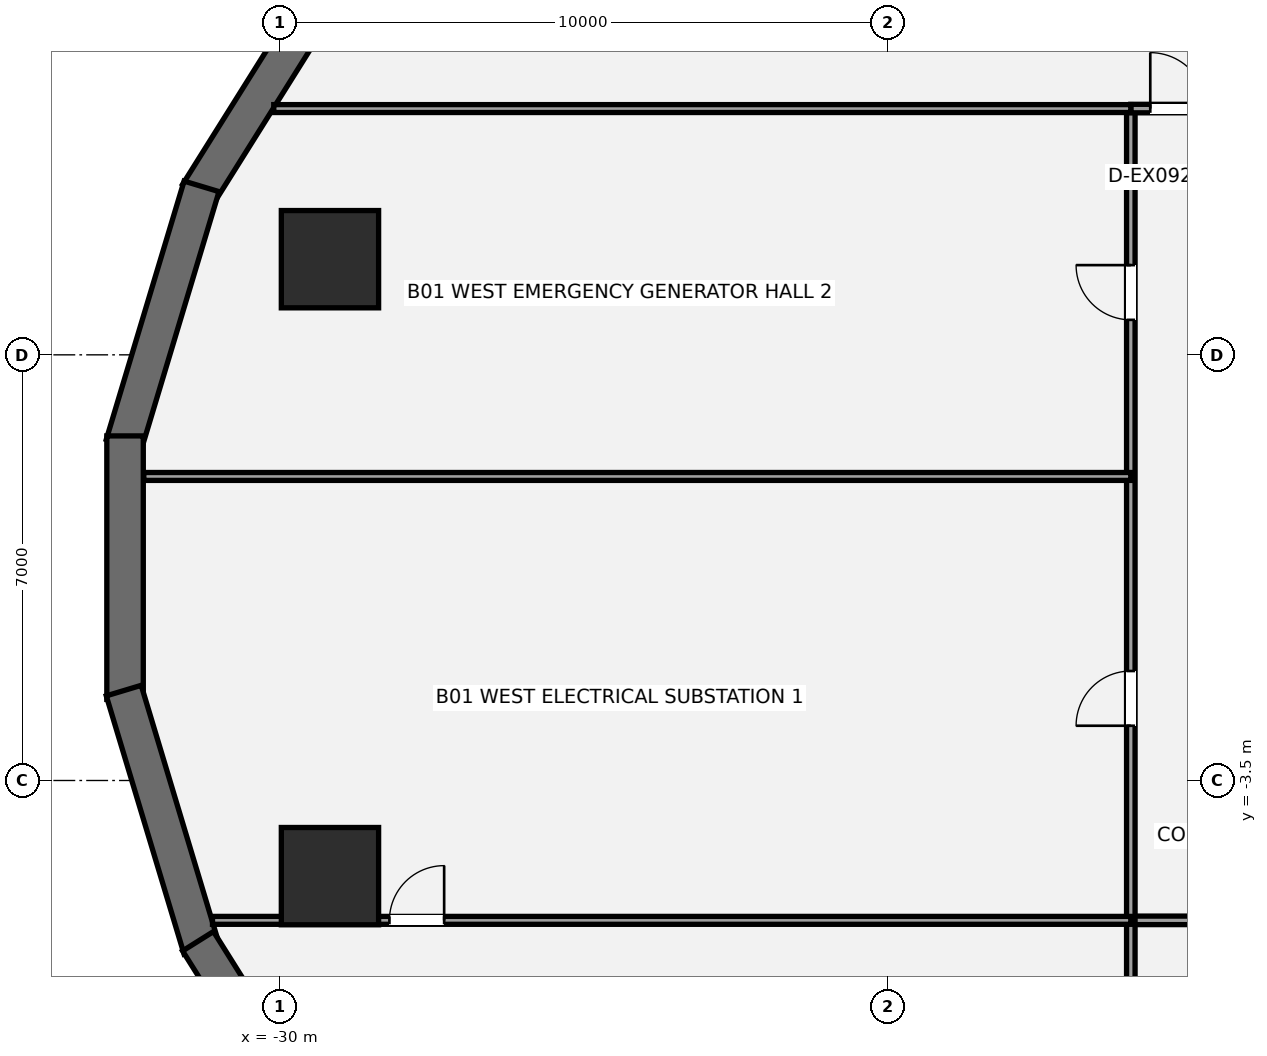
"""IFC4 building model, lengths in metres.
Left out: names, types, materials, properties, quantities, classifications, styles, units other than length and angle.
Written with IfcOpenShell. Run it as: python <this file> out.ifc"""

import sys

from ifc_helpers import new_model, si_unit, direction, frame, frame_2d, origin, origin_2d, place, context, subcontext, project, spatial, rectangle, hollow_circle, extrude, element, fill, save


model = new_model("IFC4")
c1 = context("Model", 3, precision=1e-05, world=origin(), true_north=direction((0.0, 1.0)))
c2 = subcontext(c1, "Body", "Model", "MODEL_VIEW")
j1 = project(units=[si_unit("LENGTHUNIT", "METRE"), si_unit("PLANEANGLEUNIT", "RADIAN")], contexts=[c1])
p1 = place(None, origin())
s1 = spatial("IfcSite", under=j1, at=p1, CompositionType="ELEMENT")
p2 = place(p1, origin())
s2 = spatial("IfcBuilding", under=s1, at=p2, CompositionType="ELEMENT")
p3 = place(p2, frame((0.0, 0.0, -4.4)))
s3 = spatial("IfcBuildingStorey", under=s2, at=p3, CompositionType="ELEMENT", Elevation=-4.4)
p4 = place(p3, frame((-28.833, 10.142, 0.0), z_axis=(0.0, 0.0, 1.0), x_axis=(-0.531244363113, -0.847218641592, 0.0)))
e1 = element("IfcWall", 1, at=p4, inside=s3, PredefinedType="USERDEFINED", context=c2, shape_type="SweptSolid", body=[
    extrude(rectangle(XDim=4.72, YDim=0.6, at=frame_2d((2.36, 0.0))), origin(), (0.0, 0.0, 1.0), 4.4),
])
p5 = place(p3, frame((-31.283, 6.271, 0.0), z_axis=(0.0, 0.0, 1.0), x_axis=(-0.288296686647, -0.95754113252, 0.0)))
e2 = element("IfcWall", 2, at=p5, inside=s3, PredefinedType="USERDEFINED", context=c2, shape_type="SweptSolid", body=[
    extrude(rectangle(XDim=4.438, YDim=0.6, at=frame_2d((2.219, 0.0))), origin(), (0.0, 0.0, 1.0), 4.4),
])
p6 = place(p3, frame((-32.541, 2.167, 0.0), z_axis=(0.0, 0.0, 1.0), x_axis=(0.0, -1.0, 0.0)))
e3 = element("IfcWall", 3, at=p6, inside=s3, PredefinedType="USERDEFINED", context=c2, shape_type="SweptSolid", body=[
    extrude(rectangle(XDim=4.333, YDim=0.6, at=frame_2d((2.167, 0.0))), origin(), (0.0, 0.0, 1.0), 4.4),
])
p7 = place(p3, frame((-32.562, -2.021, 0.0), z_axis=(0.0, 0.0, 1.0), x_axis=(0.288296686647, -0.95754113252, 0.0)))
e4 = element("IfcWall", 4, at=p7, inside=s3, PredefinedType="USERDEFINED", context=c2, shape_type="SweptSolid", body=[
    extrude(rectangle(XDim=4.438, YDim=0.6, at=frame_2d((2.219, 0.0))), origin(), (0.0, 0.0, 1.0), 4.4),
])
p8 = place(p3, frame((-31.341, -6.143, 0.0), z_axis=(0.0, 0.0, 1.0), x_axis=(0.531244363113, -0.847218641592, 0.0)))
e5 = element("IfcWall", 5, at=p8, inside=s3, PredefinedType="USERDEFINED", context=c2, shape_type="SweptSolid", body=[
    extrude(rectangle(XDim=4.72, YDim=0.6, at=frame_2d((2.36, 0.0))), origin(), (0.0, 0.0, 1.0), 4.4),
])
for number, where, z_axis, x_axis in (
    (6, (-29.171, 5.073, 0.0), (0.0, 0.0, 1.0), (1.0, 0.0, 0.0)),
    (7, (-29.171, -5.073, 0.0), (0.0, 0.0, 1.0), (1.0, 0.0, 0.0)),
):
    element("IfcColumn", number, at=place(p3, frame(where, z_axis=z_axis, x_axis=x_axis)), inside=s3, PredefinedType="USERDEFINED", context=c2, shape_type="SweptSolid", body=[
        extrude(hollow_circle(Radius=0.8, WallThickness=0.06, at=origin_2d()), origin(), (0.0, 0.0, 1.0), 4.4),
    ])
p9 = place(p3, frame((-16.0, -5.8, 0.0), z_axis=(0.0, 0.0, 1.0), x_axis=(1.0, 0.0, 0.0)))
e8 = element("IfcWall", 8, at=p9, inside=s3, PredefinedType="PARTITIONING", context=c2, shape_type="SweptSolid", body=[
    extrude(rectangle(XDim=32.0, YDim=0.14, at=frame_2d((16.0, 0.0))), origin(), (0.0, 0.0, 1.0), 4.14),
])
p10 = place(p9, frame((3.05, 0.0, 0.0)))
e9 = element("IfcOpeningElement", 9, at=p10, cuts=e8, PredefinedType="OPENING", context=c2, shape_type="SweptSolid", body=[
    extrude(rectangle(XDim=0.9, YDim=2.1, at=frame_2d((0.45, 1.05))), frame((0.0, 0.08, 0.0), z_axis=(0.0, -1.0, 0.0), x_axis=(1.0, 0.0, 0.0)), (0.0, 0.0, 1.0), 0.16),
])
p11 = place(p9, frame((11.05, 0.0, 0.0)))
e10 = element("IfcOpeningElement", 10, at=p11, cuts=e8, PredefinedType="OPENING", context=c2, shape_type="SweptSolid", body=[
    extrude(rectangle(XDim=0.9, YDim=2.1, at=frame_2d((0.45, 1.05))), frame((0.0, 0.08, 0.0), z_axis=(0.0, -1.0, 0.0), x_axis=(1.0, 0.0, 0.0)), (0.0, 0.0, 1.0), 0.16),
])
p12 = place(p9, frame((20.05, 0.0, 0.0)))
e11 = element("IfcOpeningElement", 11, at=p12, cuts=e8, PredefinedType="OPENING", context=c2, shape_type="SweptSolid", body=[
    extrude(rectangle(XDim=0.9, YDim=2.1, at=frame_2d((0.45, 1.05))), frame((0.0, 0.08, 0.0), z_axis=(0.0, -1.0, 0.0), x_axis=(1.0, 0.0, 0.0)), (0.0, 0.0, 1.0), 0.16),
])
p13 = place(p9, frame((28.05, 0.0, 0.0)))
e12 = element("IfcOpeningElement", 12, at=p13, cuts=e8, PredefinedType="OPENING", context=c2, shape_type="SweptSolid", body=[
    extrude(rectangle(XDim=0.9, YDim=2.1, at=frame_2d((0.45, 1.05))), frame((0.0, 0.08, 0.0), z_axis=(0.0, -1.0, 0.0), x_axis=(1.0, 0.0, 0.0)), (0.0, 0.0, 1.0), 0.16),
])
p14 = place(p3, frame((-16.0, -18.365, 0.0), z_axis=(0.0, 0.0, 1.0), x_axis=(0.0, 1.0, 0.0)))
e13 = element("IfcWall", 13, at=p14, inside=s3, PredefinedType="PARTITIONING", context=c2, shape_type="SweptSolid", body=[
    extrude(rectangle(XDim=25.916, YDim=0.14, at=frame_2d((12.958, 0.0))), origin(), (0.0, 0.0, 1.0), 3.508),
])
p15 = place(p14, frame((15.766, 0.0, 0.0)))
e14 = element("IfcOpeningElement", 14, at=p15, cuts=e13, PredefinedType="OPENING", context=c2, shape_type="SweptSolid", body=[
    extrude(rectangle(XDim=0.9, YDim=2.1, at=frame_2d((0.45, 1.05))), frame((0.0, 0.08, 0.0), z_axis=(0.0, -1.0, 0.0), x_axis=(1.0, 0.0, 0.0)), (0.0, 0.0, 1.0), 0.16),
])
p16 = place(p14, frame((22.441, 0.0, 0.0)))
e15 = element("IfcOpeningElement", 15, at=p16, cuts=e13, PredefinedType="OPENING", context=c2, shape_type="SweptSolid", body=[
    extrude(rectangle(XDim=0.9, YDim=2.1, at=frame_2d((0.45, 1.05))), frame((0.0, 0.08, 0.0), z_axis=(0.0, -1.0, 0.0), x_axis=(1.0, 0.0, 0.0)), (0.0, 0.0, 1.0), 0.16),
])
p17 = place(p3, frame((-16.0, 7.55, 0.0), z_axis=(0.0, 0.0, 1.0), x_axis=(1.0, 0.0, 0.0)))
e16 = element("IfcWall", 16, at=p17, inside=s3, PredefinedType="PARTITIONING", context=c2, shape_type="SweptSolid", body=[
    extrude(rectangle(XDim=1.95, YDim=0.14, at=frame_2d((0.975, 0.0))), origin(), (0.0, 0.0, 1.0), 4.14),
])
p18 = place(p17, frame((0.32, 0.0, 0.0)))
e17 = element("IfcOpeningElement", 17, at=p18, cuts=e16, PredefinedType="OPENING", context=c2, shape_type="SweptSolid", body=[
    extrude(rectangle(XDim=0.92, YDim=2.15, at=frame_2d((0.46, 1.075))), frame((0.0, 0.08, 0.0), z_axis=(0.0, -1.0, 0.0), x_axis=(1.0, 0.0, 0.0)), (0.0, 0.0, 1.0), 0.16),
])
p19 = place(p3, frame((-30.095, 7.55, 0.0), z_axis=(0.0, 0.0, 1.0), x_axis=(1.0, 0.0, 0.0)))
e18 = element("IfcWall", 18, at=p19, inside=s3, PredefinedType="PARTITIONING", context=c2, shape_type="SweptSolid", body=[
    extrude(rectangle(XDim=14.095, YDim=0.13, at=frame_2d((7.048, 0.0))), origin(), (0.0, 0.0, 1.0), 3.118),
])
p20 = place(p3, frame((-31.103, -5.8, 0.0), z_axis=(0.0, 0.0, 1.0), x_axis=(1.0, 0.0, 0.0)))
e19 = element("IfcWall", 19, at=p20, inside=s3, PredefinedType="PARTITIONING", context=c2, shape_type="SweptSolid", body=[
    extrude(rectangle(XDim=15.103, YDim=0.13, at=frame_2d((7.552, 0.0))), origin(), (0.0, 0.0, 1.0), 3.118),
])
p21 = place(p20, frame((2.91, 0.0, 0.0)))
e20 = element("IfcOpeningElement", 20, at=p21, cuts=e19, PredefinedType="OPENING", context=c2, shape_type="SweptSolid", body=[
    extrude(rectangle(XDim=0.9, YDim=2.1, at=frame_2d((0.45, 1.05))), frame((0.0, 0.075, 0.0), z_axis=(0.0, -1.0, 0.0), x_axis=(1.0, 0.0, 0.0)), (0.0, 0.0, 1.0), 0.15),
])
p22 = place(p3, frame((-32.233, 1.5, 0.0), z_axis=(0.0, 0.0, 1.0), x_axis=(1.0, 0.0, 0.0)))
e21 = element("IfcWall", 21, at=p22, inside=s3, PredefinedType="PARTITIONING", context=c2, shape_type="SweptSolid", body=[
    extrude(rectangle(XDim=16.233, YDim=0.13, at=frame_2d((8.117, 0.0))), origin(), (0.0, 0.0, 1.0), 4.14),
])
p23 = place(p18, origin())
e22 = element("IfcDoor", 22, at=p23, inside=s3, OperationType="SINGLE_SWING_LEFT", PredefinedType="DOOR", context=c2, shape_type="SweptSolid", body=[
    extrude(rectangle(XDim=0.92, YDim=2.15, at=frame_2d((0.46, 1.075))), frame((0.0, 0.025, 0.0), z_axis=(0.0, -1.0, 0.0), x_axis=(1.0, 0.0, 0.0)), (0.0, 0.0, 1.0), 0.05),
])
fill(e17, e22)
p24 = place(p21, origin())
e23 = element("IfcDoor", 23, at=p24, inside=s3, OperationType="SINGLE_SWING_RIGHT", PredefinedType="DOOR", context=c2, shape_type="SweptSolid", body=[
    extrude(rectangle(XDim=0.9, YDim=2.1, at=frame_2d((0.45, 1.05))), frame((0.0, 0.025, 0.0), z_axis=(0.0, -1.0, 0.0), x_axis=(1.0, 0.0, 0.0)), (0.0, 0.0, 1.0), 0.05),
])
fill(e20, e23)
p25 = place(p15, origin())
e24 = element("IfcDoor", 24, at=p25, inside=s3, OperationType="SINGLE_SWING_LEFT", PredefinedType="DOOR", context=c2, shape_type="SweptSolid", body=[
    extrude(rectangle(XDim=0.9, YDim=2.1, at=frame_2d((0.45, 1.05))), frame((0.0, 0.025, 0.0), z_axis=(0.0, -1.0, 0.0), x_axis=(1.0, 0.0, 0.0)), (0.0, 0.0, 1.0), 0.05),
])
fill(e14, e24)
p26 = place(p16, origin())
e25 = element("IfcDoor", 25, at=p26, inside=s3, OperationType="SINGLE_SWING_RIGHT", PredefinedType="DOOR", context=c2, shape_type="SweptSolid", body=[
    extrude(rectangle(XDim=0.9, YDim=2.1, at=frame_2d((0.45, 1.05))), frame((0.0, 0.025, 0.0), z_axis=(0.0, -1.0, 0.0), x_axis=(1.0, 0.0, 0.0)), (0.0, 0.0, 1.0), 0.05),
])
fill(e15, e25)
save(model, sys.argv[1])
